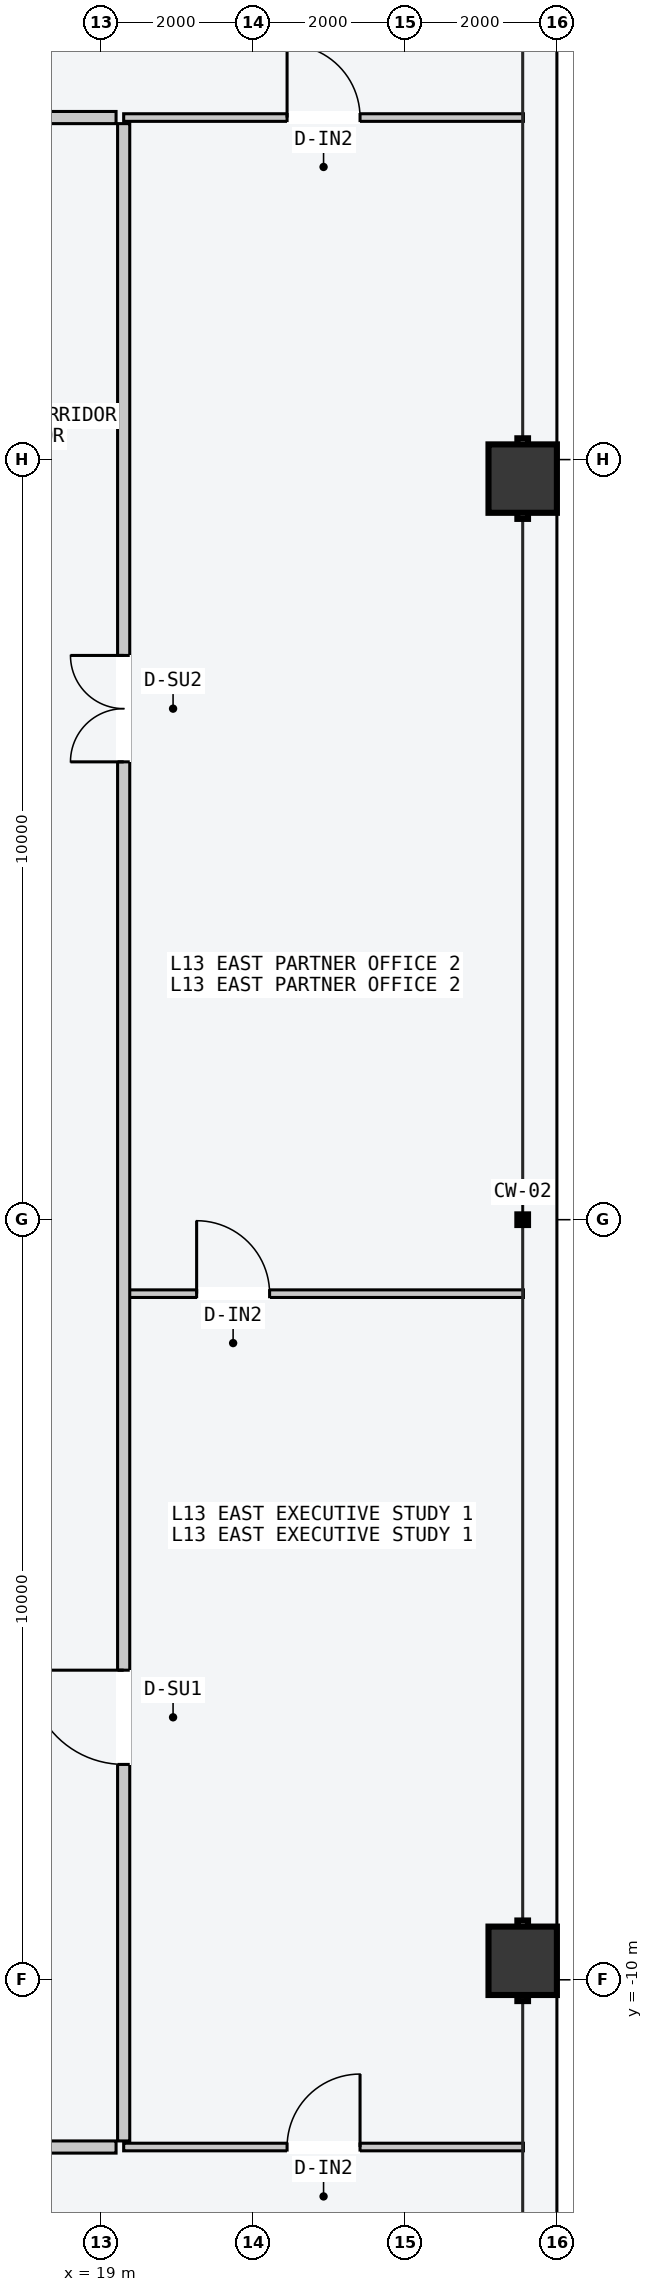
"""IFC4 building model, lengths in metres.
Left out: names, types, materials, properties, quantities, classifications, styles, units other than length and angle.
Written with IfcOpenShell. Run it as: python <this file> out.ifc"""

import sys

from ifc_helpers import new_model, si_unit, direction, frame, frame_2d, origin, origin_2d, place, context, subcontext, project, spatial, rectangle, hollow_rectangle, extrude, element, fill, save


model = new_model("IFC4")
c1 = context("Model", 3, precision=1e-05, world=origin(), true_north=direction((0.0, 1.0)))
c2 = subcontext(c1, "Body", "Model", "MODEL_VIEW")
j1 = project(units=[si_unit("LENGTHUNIT", "METRE"), si_unit("PLANEANGLEUNIT", "RADIAN")], contexts=[c1])
p1 = place(None, origin())
s1 = spatial("IfcSite", under=j1, at=p1, CompositionType="ELEMENT")
p2 = place(p1, origin())
s2 = spatial("IfcBuilding", under=s1, at=p2, CompositionType="ELEMENT")
p3 = place(p2, frame((0.0, 0.0, 52.8)))
s3 = spatial("IfcBuildingStorey", under=s2, at=p3, CompositionType="ELEMENT", Elevation=52.8)
for number, where, z_axis, x_axis in (
    (1, (24.55, -9.75, 0.0), (0.0, 0.0, 1.0), (0.0, 1.0, 0.0)),
    (2, (24.55, 9.75, 0.0), (0.0, 0.0, 1.0), (0.0, 1.0, 0.0)),
):
    element("IfcColumn", number, at=place(p3, frame(where, z_axis=z_axis, x_axis=x_axis)), inside=s3, PredefinedType="COLUMN", context=c2, shape_type="SweptSolid", body=[
        extrude(hollow_rectangle(XDim=0.9, YDim=0.9, WallThickness=0.045, at=origin_2d()), origin(), (0.0, 0.0, 1.0), 3.6),
    ])
p4 = place(p3, frame((-19.2, 14.5, 0.0), z_axis=(0.0, 0.0, 1.0), x_axis=(1.0, 0.0, 0.0)))
e3 = element("IfcWall", 3, at=p4, inside=s3, PredefinedType="PARTITIONING", context=c2, shape_type="SweptSolid", body=[
    extrude(rectangle(XDim=38.4, YDim=0.16, at=frame_2d((19.2, 0.0))), origin(), (0.0, 0.0, 1.0), 3.4),
])
p5 = place(p4, frame((3.495, 0.0, 0.0)))
e4 = element("IfcOpeningElement", 4, at=p5, cuts=e3, PredefinedType="OPENING", context=c2, shape_type="SweptSolid", body=[
    extrude(rectangle(XDim=1.06, YDim=2.2, at=frame_2d((0.53, 1.1))), frame((0.0, 0.09, 0.0), z_axis=(0.0, -1.0, 0.0), x_axis=(1.0, 0.0, 0.0)), (0.0, 0.0, 1.0), 0.18),
])
p6 = place(p4, frame((14.001, 0.0, 0.0)))
e5 = element("IfcOpeningElement", 5, at=p6, cuts=e3, PredefinedType="OPENING", context=c2, shape_type="SweptSolid", body=[
    extrude(rectangle(XDim=1.24, YDim=2.24, at=frame_2d((0.62, 1.12))), frame((0.0, 0.09, 0.0), z_axis=(0.0, -1.0, 0.0), x_axis=(1.0, 0.0, 0.0)), (0.0, 0.0, 1.0), 0.18),
])
p7 = place(p4, frame((24.672, 0.0, 0.0)))
e6 = element("IfcOpeningElement", 6, at=p7, cuts=e3, PredefinedType="OPENING", context=c2, shape_type="SweptSolid", body=[
    extrude(rectangle(XDim=1.4, YDim=2.2, at=frame_2d((0.7, 1.1))), frame((0.0, 0.09, 0.0), z_axis=(0.0, -1.0, 0.0), x_axis=(1.0, 0.0, 0.0)), (0.0, 0.0, 1.0), 0.18),
])
p8 = place(p4, frame((33.527, 0.0, 0.0)))
e7 = element("IfcOpeningElement", 7, at=p8, cuts=e3, PredefinedType="OPENING", context=c2, shape_type="SweptSolid", body=[
    extrude(rectangle(XDim=0.9, YDim=2.15, at=frame_2d((0.45, 1.075))), frame((0.0, 0.09, 0.0), z_axis=(0.0, -1.0, 0.0), x_axis=(1.0, 0.0, 0.0)), (0.0, 0.0, 1.0), 0.18),
])
p9 = place(p3, frame((19.3, 14.5, 0.0), z_axis=(0.0, 0.0, 1.0), x_axis=(1.0, 0.0, 0.0)))
e8 = element("IfcWall", 8, at=p9, inside=s3, PredefinedType="PARTITIONING", context=c2, shape_type="SweptSolid", body=[
    extrude(rectangle(XDim=5.26, YDim=0.1, at=frame_2d((2.63, 0.0))), origin(), (0.0, 0.0, 1.0), 3.4),
])
p10 = place(p9, frame((2.15, 0.0, 0.0)))
e9 = element("IfcOpeningElement", 9, at=p10, cuts=e8, PredefinedType="OPENING", context=c2, shape_type="SweptSolid", body=[
    extrude(rectangle(XDim=0.96, YDim=2.18, at=frame_2d((0.48, 1.09))), frame((0.0, 0.06, 0.0), z_axis=(0.0, -1.0, 0.0), x_axis=(1.0, 0.0, 0.0)), (0.0, 0.0, 1.0), 0.12),
])
p11 = place(p3, frame((-19.2, -12.2, 0.0), z_axis=(0.0, 0.0, 1.0), x_axis=(1.0, 0.0, 0.0)))
e10 = element("IfcWall", 10, at=p11, inside=s3, PredefinedType="PARTITIONING", context=c2, shape_type="SweptSolid", body=[
    extrude(rectangle(XDim=38.4, YDim=0.16, at=frame_2d((19.2, 0.0))), origin(), (0.0, 0.0, 1.0), 1.74),
])
p12 = place(p3, frame((19.3, -12.2, 0.0), z_axis=(0.0, 0.0, 1.0), x_axis=(1.0, 0.0, 0.0)))
e11 = element("IfcWall", 11, at=p12, inside=s3, PredefinedType="PARTITIONING", context=c2, shape_type="SweptSolid", body=[
    extrude(rectangle(XDim=5.26, YDim=0.1, at=frame_2d((2.63, 0.0))), origin(), (0.0, 0.0, 1.0), 3.4),
])
p13 = place(p12, frame((2.15, 0.0, 0.0)))
e12 = element("IfcOpeningElement", 12, at=p13, cuts=e11, PredefinedType="OPENING", context=c2, shape_type="SweptSolid", body=[
    extrude(rectangle(XDim=0.96, YDim=2.18, at=frame_2d((0.48, 1.09))), frame((0.0, 0.06, 0.0), z_axis=(0.0, -1.0, 0.0), x_axis=(1.0, 0.0, 0.0)), (0.0, 0.0, 1.0), 0.12),
])
p14 = place(p3, frame((19.36, -0.973, 0.0), z_axis=(0.0, 0.0, 1.0), x_axis=(1.0, 0.0, 0.0)))
e13 = element("IfcWall", 13, at=p14, inside=s3, PredefinedType="PARTITIONING", context=c2, shape_type="SweptSolid", body=[
    extrude(rectangle(XDim=5.2, YDim=0.1, at=frame_2d((2.6, 0.0))), origin(), (0.0, 0.0, 1.0), 3.4),
])
p15 = place(p14, frame((0.9, 0.0, 0.0)))
e14 = element("IfcOpeningElement", 14, at=p15, cuts=e13, PredefinedType="OPENING", context=c2, shape_type="SweptSolid", body=[
    extrude(rectangle(XDim=0.96, YDim=2.18, at=frame_2d((0.48, 1.09))), frame((0.0, 0.06, 0.0), z_axis=(0.0, -1.0, 0.0), x_axis=(1.0, 0.0, 0.0)), (0.0, 0.0, 1.0), 0.12),
])
p16 = place(p3, frame((19.3, -12.12, 0.0), z_axis=(0.0, 0.0, 1.0), x_axis=(0.0, 1.0, 0.0)))
e15 = element("IfcWall", 15, at=p16, inside=s3, PredefinedType="PARTITIONING", context=c2, shape_type="SweptSolid", body=[
    extrude(rectangle(XDim=26.54, YDim=0.16, at=frame_2d((13.27, 0.0))), origin(), (0.0, 0.0, 1.0), 3.4),
])
p17 = place(p16, frame((4.953, 0.0, 0.0)))
e16 = element("IfcOpeningElement", 16, at=p17, cuts=e15, PredefinedType="OPENING", context=c2, shape_type="SweptSolid", body=[
    extrude(rectangle(XDim=1.24, YDim=2.24, at=frame_2d((0.62, 1.12))), frame((0.0, 0.09, 0.0), z_axis=(0.0, -1.0, 0.0), x_axis=(1.0, 0.0, 0.0)), (0.0, 0.0, 1.0), 0.18),
])
p18 = place(p16, frame((18.143, 0.0, 0.0)))
e17 = element("IfcOpeningElement", 17, at=p18, cuts=e15, PredefinedType="OPENING", context=c2, shape_type="SweptSolid", body=[
    extrude(rectangle(XDim=1.4, YDim=2.2, at=frame_2d((0.7, 1.1))), frame((0.0, 0.09, 0.0), z_axis=(0.0, -1.0, 0.0), x_axis=(1.0, 0.0, 0.0)), (0.0, 0.0, 1.0), 0.18),
])
p19 = place(p10, origin())
e18 = element("IfcDoor", 18, at=p19, inside=s3, OperationType="SINGLE_SWING_LEFT", PredefinedType="DOOR", context=c2, shape_type="SweptSolid", body=[
    extrude(rectangle(XDim=0.96, YDim=2.18, at=frame_2d((0.48, 1.09))), frame((0.0, 0.025, 0.0), z_axis=(0.0, -1.0, 0.0), x_axis=(1.0, 0.0, 0.0)), (0.0, 0.0, 1.0), 0.05),
])
fill(e9, e18)
p20 = place(p13, origin())
e19 = element("IfcDoor", 19, at=p20, inside=s3, OperationType="SINGLE_SWING_RIGHT", PredefinedType="DOOR", context=c2, shape_type="SweptSolid", body=[
    extrude(rectangle(XDim=0.96, YDim=2.18, at=frame_2d((0.48, 1.09))), frame((0.0, 0.025, 0.0), z_axis=(0.0, -1.0, 0.0), x_axis=(1.0, 0.0, 0.0)), (0.0, 0.0, 1.0), 0.05),
])
fill(e12, e19)
p21 = place(p15, origin())
e20 = element("IfcDoor", 20, at=p21, inside=s3, OperationType="SINGLE_SWING_LEFT", PredefinedType="DOOR", context=c2, shape_type="SweptSolid", body=[
    extrude(rectangle(XDim=0.96, YDim=2.18, at=frame_2d((0.48, 1.09))), frame((0.0, 0.025, 0.0), z_axis=(0.0, -1.0, 0.0), x_axis=(1.0, 0.0, 0.0)), (0.0, 0.0, 1.0), 0.05),
])
fill(e14, e20)
p22 = place(p17, origin())
e21 = element("IfcDoor", 21, at=p22, inside=s3, OperationType="SINGLE_SWING_RIGHT", PredefinedType="DOOR", context=c2, shape_type="SweptSolid", body=[
    extrude(rectangle(XDim=1.24, YDim=2.24, at=frame_2d((0.62, 1.12))), frame((0.0, 0.025, 0.0), z_axis=(0.0, -1.0, 0.0), x_axis=(1.0, 0.0, 0.0)), (0.0, 0.0, 1.0), 0.05),
])
fill(e16, e21)
p23 = place(p18, origin())
e22 = element("IfcDoor", 22, at=p23, inside=s3, OperationType="DOUBLE_DOOR_SINGLE_SWING", PredefinedType="DOOR", context=c2, shape_type="SweptSolid", body=[
    extrude(rectangle(XDim=1.4, YDim=2.2, at=frame_2d((0.7, 1.1))), frame((0.0, 0.025, 0.0), z_axis=(0.0, -1.0, 0.0), x_axis=(1.0, 0.0, 0.0)), (0.0, 0.0, 1.0), 0.05),
])
fill(e17, e22)
save(model, sys.argv[1])
